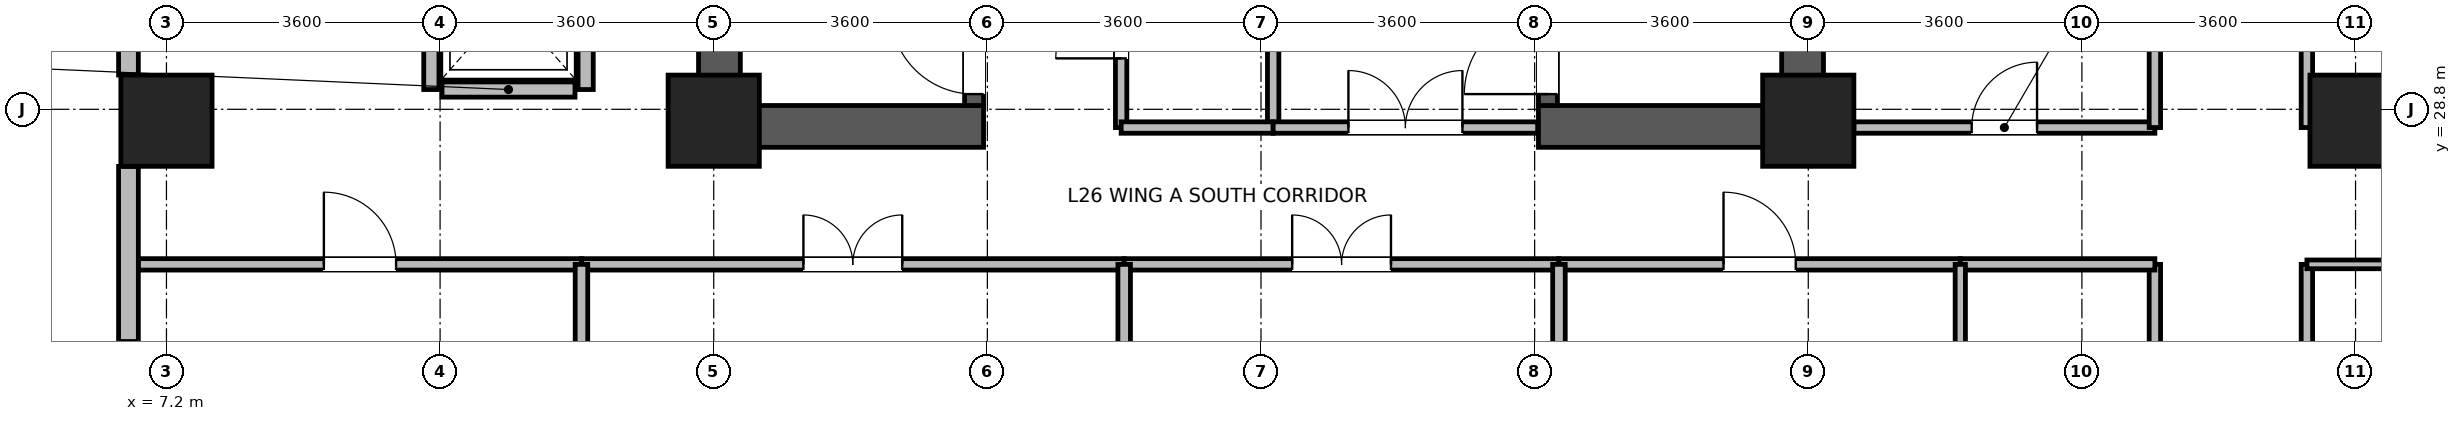
"""IFC4 building model, lengths in metres.
Left out: names, types, materials, properties, quantities, classifications, styles, units other than length and angle.
Written with IfcOpenShell. Run it as: python <this file> out.ifc"""

import sys

from ifc_helpers import new_model, si_unit, direction, frame, frame_2d, origin, origin_2d, place, context, subcontext, project, spatial, rectangle, extrude, source, transform, mapped, element, fill, save


model = new_model("IFC4")
c1 = context("Model", 3, precision=1e-05, world=origin(), true_north=direction((0.0, 1.0)))
c2 = subcontext(c1, "Body", "Model", "MODEL_VIEW")
j1 = project(units=[si_unit("LENGTHUNIT", "METRE"), si_unit("PLANEANGLEUNIT", "RADIAN")], contexts=[c1])
p1 = place(None, origin())
s1 = spatial("IfcSite", under=j1, at=p1, CompositionType="ELEMENT")
p2 = place(p1, origin())
s2 = spatial("IfcBuilding", under=s1, at=p2, CompositionType="ELEMENT")
p3 = place(p2, frame((0.0, 0.0, 104.5)))
s3 = spatial("IfcBuildingStorey", under=s2, at=p3, CompositionType="ELEMENT", Elevation=104.5)
for number, where, z_axis, x_axis in (
    (1, (14.475, 28.3, 0.0), (0.0, 0.0, 1.0), (0.0, 1.0, 0.0)),
    (2, (28.725, 28.3, 0.0), (0.0, 0.0, 1.0), (0.0, 1.0, 0.0)),
):
    element("IfcWall", number, at=place(p3, frame(where, z_axis=z_axis, x_axis=x_axis)), inside=s3, PredefinedType="SHEAR", context=c2, shape_type="SweptSolid", body=[
        extrude(rectangle(XDim=8.1, YDim=0.55, at=frame_2d((4.05, 0.0))), origin(), (0.0, 0.0, 1.0), 3.45),
    ])
for number, where, z_axis, x_axis in (
    (3, (14.75, 28.575, 0.0), (0.0, 0.0, 1.0), (1.0, 0.0, 0.0)),
    (4, (25.25, 28.575, 0.0), (0.0, 0.0, 1.0), (1.0, 0.0, 0.0)),
):
    element("IfcWall", number, at=place(p3, frame(where, z_axis=z_axis, x_axis=x_axis)), inside=s3, PredefinedType="SHEAR", context=c2, shape_type="SweptSolid", body=[
        extrude(rectangle(XDim=3.2, YDim=0.55, at=frame_2d((1.6, 0.0))), origin(), (0.0, 0.0, 1.0), 3.45),
    ])
p4 = place(p3, frame((17.825, 28.85, 0.0), z_axis=(0.0, 0.0, 1.0), x_axis=(0.0, 1.0, 0.0)))
e5 = element("IfcWall", 5, at=p4, inside=s3, PredefinedType="SHEAR", context=c2, shape_type="SweptSolid", body=[
    extrude(rectangle(XDim=7.0, YDim=0.25, at=frame_2d((3.5, 0.0))), origin(), (0.0, 0.0, 1.0), 3.45),
])
p5 = place(p4, frame((0.15, 0.0, 0.0)))
e6 = element("IfcOpeningElement", 6, at=p5, cuts=e5, PredefinedType="OPENING", context=c2, shape_type="SweptSolid", body=[
    extrude(rectangle(XDim=1.1, YDim=2.08, at=frame_2d((0.55, 1.04))), frame((0.0, 0.135, 0.0), z_axis=(0.0, -1.0, 0.0), x_axis=(1.0, 0.0, 0.0)), (0.0, 0.0, 1.0), 0.27),
])
p6 = place(p3, frame((25.375, 28.85, 0.0), z_axis=(0.0, 0.0, 1.0), x_axis=(0.0, 1.0, 0.0)))
e7 = element("IfcWall", 7, at=p6, inside=s3, PredefinedType="SHEAR", context=c2, shape_type="SweptSolid", body=[
    extrude(rectangle(XDim=7.0, YDim=0.25, at=frame_2d((3.5, 0.0))), origin(), (0.0, 0.0, 1.0), 3.45),
])
p7 = place(p6, frame((0.15, 0.0, 0.0)))
e8 = element("IfcOpeningElement", 8, at=p7, cuts=e7, PredefinedType="OPENING", context=c2, shape_type="SweptSolid", body=[
    extrude(rectangle(XDim=1.1, YDim=2.08, at=frame_2d((0.55, 1.04))), frame((0.0, 0.135, 0.0), z_axis=(0.0, -1.0, 0.0), x_axis=(1.0, 0.0, 0.0)), (0.0, 0.0, 1.0), 0.27),
])
m1 = source(origin(), c2, "Body", "SweptSolid", [
    extrude(rectangle(XDim=1.2, YDim=1.2, at=origin_2d()), origin(), (0.0, 0.0, 1.0), 3.7),
])
for number, where, z_axis, x_axis in (
    (9, (7.2, 28.65, 0.0), (0.0, 0.0, 1.0), (1.0, 0.0, 0.0)),
    (10, (14.4, 28.65, 0.0), (0.0, 0.0, 1.0), (1.0, 0.0, 0.0)),
    (11, (28.8, 28.65, 0.0), (0.0, 0.0, 1.0), (1.0, 0.0, 0.0)),
    (12, (36.0, 28.65, 0.0), (0.0, 0.0, 1.0), (1.0, 0.0, 0.0)),
):
    element("IfcColumn", number, at=place(p3, frame(where, z_axis=z_axis, x_axis=x_axis)), inside=s3, PredefinedType="COLUMN", context=c2, shape_type="MappedRepresentation", body=[
        mapped(m1, transform((0.0, 0.0, 0.0), x_axis=(1.0, 0.0, 0.0), y_axis=(0.0, 1.0, 0.0), z_axis=(0.0, 0.0, 1.0), scale=1.0)),
    ])
p8 = place(p3, frame((6.7, 29.251, 0.0), z_axis=(0.0, 0.0, 1.0), x_axis=(0.0, 1.0, 0.0)))
e13 = element("IfcWall", 13, at=p8, inside=s3, PredefinedType="STANDARD", context=c2, shape_type="SweptSolid", body=[
    extrude(rectangle(XDim=6.298, YDim=0.26, at=frame_2d((3.149, 0.0))), origin(), (0.0, 0.0, 1.0), 3.43),
])
p9 = place(p8, frame((0.675, 0.0, 0.85)))
e14 = element("IfcOpeningElement", 14, at=p9, cuts=e13, PredefinedType="OPENING", context=c2, shape_type="SweptSolid", body=[
    extrude(rectangle(XDim=1.8, YDim=1.85, at=frame_2d((0.9, 0.925))), frame((0.0, 0.14, 0.0), z_axis=(0.0, -1.0, 0.0), x_axis=(1.0, 0.0, 0.0)), (0.0, 0.0, 1.0), 0.28),
])
p10 = place(p8, frame((3.823, 0.0, 0.85)))
e15 = element("IfcOpeningElement", 15, at=p10, cuts=e13, PredefinedType="OPENING", context=c2, shape_type="SweptSolid", body=[
    extrude(rectangle(XDim=1.8, YDim=1.85, at=frame_2d((0.9, 0.925))), frame((0.0, 0.14, 0.0), z_axis=(0.0, -1.0, 0.0), x_axis=(1.0, 0.0, 0.0)), (0.0, 0.0, 1.0), 0.28),
])
p11 = place(p3, frame((6.7, 21.47, 0.0), z_axis=(0.0, 0.0, 1.0), x_axis=(0.0, 1.0, 0.0)))
e16 = element("IfcWall", 16, at=p11, inside=s3, PredefinedType="STANDARD", context=c2, shape_type="SweptSolid", body=[
    extrude(rectangle(XDim=6.579, YDim=0.26, at=frame_2d((3.29, 0.0))), origin(), (0.0, 0.0, 1.0), 3.43),
])
p12 = place(p11, frame((0.745, 0.0, 0.85)))
e17 = element("IfcOpeningElement", 17, at=p12, cuts=e16, PredefinedType="OPENING", context=c2, shape_type="SweptSolid", body=[
    extrude(rectangle(XDim=1.8, YDim=1.85, at=frame_2d((0.9, 0.925))), frame((0.0, 0.14, 0.0), z_axis=(0.0, -1.0, 0.0), x_axis=(1.0, 0.0, 0.0)), (0.0, 0.0, 1.0), 0.28),
])
p13 = place(p11, frame((3.341, 0.0, 0.85)))
e18 = element("IfcOpeningElement", 18, at=p13, cuts=e16, PredefinedType="OPENING", context=c2, shape_type="SweptSolid", body=[
    extrude(rectangle(XDim=0.95, YDim=1.75, at=frame_2d((0.475, 0.875))), frame((0.0, 0.14, 0.0), z_axis=(0.0, -1.0, 0.0), x_axis=(1.0, 0.0, 0.0)), (0.0, 0.0, 1.0), 0.28),
])
p14 = place(p3, frame((10.825, 29.06, 0.0), z_axis=(0.0, 0.0, 1.0), x_axis=(1.0, 0.0, 0.0)))
e19 = element("IfcWall", 19, at=p14, inside=s3, PredefinedType="PARTITIONING", context=c2, shape_type="SweptSolid", body=[
    extrude(rectangle(XDim=1.75, YDim=0.2, at=frame_2d((0.875, 0.0))), origin(), (0.0, 0.0, 1.0), 3.43),
])
for number, where, z_axis, x_axis in (
    (20, (10.685, 29.06, 0.0), (0.0, 0.0, 1.0), (0.0, 1.0, 0.0)),
    (21, (12.715, 29.06, 0.0), (0.0, 0.0, 1.0), (0.0, 1.0, 0.0)),
):
    element("IfcWall", number, at=place(p3, frame(where, z_axis=z_axis, x_axis=x_axis)), inside=s3, PredefinedType="PARTITIONING", context=c2, shape_type="SweptSolid", body=[
        extrude(rectangle(XDim=2.28, YDim=0.2, at=frame_2d((1.14, 0.0))), origin(), (0.0, 0.0, 1.0), 3.43),
    ])
p15 = place(p3, frame((35.36, 16.96, 0.0), z_axis=(0.0, 0.0, 1.0), x_axis=(0.0, 1.0, 0.0)))
e22 = element("IfcWall", 22, at=p15, inside=s3, PredefinedType="PARTITIONING", context=c2, shape_type="SweptSolid", body=[
    extrude(rectangle(XDim=9.8, YDim=0.15, at=frame_2d((4.9, 0.0))), origin(), (0.0, 0.0, 1.0), 3.43),
])
p16 = place(p15, frame((2.486, 0.0, 0.0)))
e23 = element("IfcOpeningElement", 23, at=p16, cuts=e22, PredefinedType="OPENING", context=c2, shape_type="SweptSolid", body=[
    extrude(rectangle(XDim=1.3, YDim=2.12, at=frame_2d((0.65, 1.06))), frame((0.0, 0.085, 0.0), z_axis=(0.0, -1.0, 0.0), x_axis=(1.0, 0.0, 0.0)), (0.0, 0.0, 1.0), 0.17),
])
p17 = place(p3, frame((35.36, 28.56, 0.0), z_axis=(0.0, 0.0, 1.0), x_axis=(0.0, 1.0, 0.0)))
e24 = element("IfcWall", 24, at=p17, inside=s3, PredefinedType="PARTITIONING", context=c2, shape_type="SweptSolid", body=[
    extrude(rectangle(XDim=7.68, YDim=0.15, at=frame_2d((3.84, 0.0))), origin(), (0.0, 0.0, 1.0), 3.43),
])
p18 = place(p17, frame((3.19, 0.0, 0.0)))
e25 = element("IfcOpeningElement", 25, at=p18, cuts=e24, PredefinedType="OPENING", context=c2, shape_type="SweptSolid", body=[
    extrude(rectangle(XDim=1.3, YDim=2.12, at=frame_2d((0.65, 1.06))), frame((0.0, 0.085, 0.0), z_axis=(0.0, -1.0, 0.0), x_axis=(1.0, 0.0, 0.0)), (0.0, 0.0, 1.0), 0.17),
])
p19 = place(p3, frame((12.66, 26.76, 0.0), z_axis=(0.0, 0.0, 1.0), x_axis=(1.0, 0.0, 0.0)))
e26 = element("IfcWall", 26, at=p19, inside=s3, PredefinedType="PARTITIONING", context=c2, shape_type="SweptSolid", body=[
    extrude(rectangle(XDim=7.14, YDim=0.15, at=frame_2d((3.57, 0.0))), origin(), (0.0, 0.0, 1.0), 3.43),
])
p20 = place(p19, frame((2.92, 0.0, 0.0)))
e27 = element("IfcOpeningElement", 27, at=p20, cuts=e26, PredefinedType="OPENING", context=c2, shape_type="SweptSolid", body=[
    extrude(rectangle(XDim=1.3, YDim=2.12, at=frame_2d((0.65, 1.06))), frame((0.0, 0.085, 0.0), z_axis=(0.0, -1.0, 0.0), x_axis=(1.0, 0.0, 0.0)), (0.0, 0.0, 1.0), 0.17),
])
p21 = place(p3, frame((6.832, 26.76, 0.0), z_axis=(0.0, 0.0, 1.0), x_axis=(1.0, 0.0, 0.0)))
e28 = element("IfcWall", 28, at=p21, inside=s3, PredefinedType="PARTITIONING", context=c2, shape_type="SweptSolid", body=[
    extrude(rectangle(XDim=5.828, YDim=0.15, at=frame_2d((2.914, 0.0))), origin(), (0.0, 0.0, 1.0), 3.43),
])
p22 = place(p21, frame((2.439, 0.0, 0.0)))
e29 = element("IfcOpeningElement", 29, at=p22, cuts=e28, PredefinedType="OPENING", context=c2, shape_type="SweptSolid", body=[
    extrude(rectangle(XDim=0.95, YDim=2.1, at=frame_2d((0.475, 1.05))), frame((0.0, 0.085, 0.0), z_axis=(0.0, -1.0, 0.0), x_axis=(1.0, 0.0, 0.0)), (0.0, 0.0, 1.0), 0.17),
])
p23 = place(p3, frame((19.8, 26.76, 0.0), z_axis=(0.0, 0.0, 1.0), x_axis=(1.0, 0.0, 0.0)))
e30 = element("IfcWall", 30, at=p23, inside=s3, PredefinedType="PARTITIONING", context=c2, shape_type="SweptSolid", body=[
    extrude(rectangle(XDim=5.72, YDim=0.15, at=frame_2d((2.86, 0.0))), origin(), (0.0, 0.0, 1.0), 3.43),
])
p24 = place(p23, frame((2.21, 0.0, 0.0)))
e31 = element("IfcOpeningElement", 31, at=p24, cuts=e30, PredefinedType="OPENING", context=c2, shape_type="SweptSolid", body=[
    extrude(rectangle(XDim=1.3, YDim=2.12, at=frame_2d((0.65, 1.06))), frame((0.0, 0.085, 0.0), z_axis=(0.0, -1.0, 0.0), x_axis=(1.0, 0.0, 0.0)), (0.0, 0.0, 1.0), 0.17),
])
p25 = place(p3, frame((25.52, 26.76, 0.0), z_axis=(0.0, 0.0, 1.0), x_axis=(1.0, 0.0, 0.0)))
e32 = element("IfcWall", 32, at=p25, inside=s3, PredefinedType="PARTITIONING", context=c2, shape_type="SweptSolid", body=[
    extrude(rectangle(XDim=5.28, YDim=0.15, at=frame_2d((2.64, 0.0))), origin(), (0.0, 0.0, 1.0), 3.43),
])
p26 = place(p25, frame((2.165, 0.0, 0.0)))
e33 = element("IfcOpeningElement", 33, at=p26, cuts=e32, PredefinedType="OPENING", context=c2, shape_type="SweptSolid", body=[
    extrude(rectangle(XDim=0.95, YDim=2.1, at=frame_2d((0.475, 1.05))), frame((0.0, 0.085, 0.0), z_axis=(0.0, -1.0, 0.0), x_axis=(1.0, 0.0, 0.0)), (0.0, 0.0, 1.0), 0.17),
])
p27 = place(p3, frame((33.36, 21.6, 0.0), z_axis=(0.0, 0.0, 1.0), x_axis=(0.0, 1.0, 0.0)))
e34 = element("IfcWall", 34, at=p27, inside=s3, PredefinedType="PARTITIONING", context=c2, shape_type="SweptSolid", body=[
    extrude(rectangle(XDim=5.16, YDim=0.15, at=frame_2d((2.58, 0.0))), origin(), (0.0, 0.0, 1.0), 3.43),
])
p28 = place(p27, frame((2.155, 0.0, 0.0)))
e35 = element("IfcOpeningElement", 35, at=p28, cuts=e34, PredefinedType="OPENING", context=c2, shape_type="SweptSolid", body=[
    extrude(rectangle(XDim=0.85, YDim=2.04, at=frame_2d((0.425, 1.02))), frame((0.0, 0.085, 0.0), z_axis=(0.0, -1.0, 0.0), x_axis=(1.0, 0.0, 0.0)), (0.0, 0.0, 1.0), 0.17),
])
p29 = place(p3, frame((29.4, 28.56, 0.0), z_axis=(0.0, 0.0, 1.0), x_axis=(1.0, 0.0, 0.0)))
e36 = element("IfcWall", 36, at=p29, inside=s3, PredefinedType="PARTITIONING", context=c2, shape_type="SweptSolid", body=[
    extrude(rectangle(XDim=3.96, YDim=0.15, at=frame_2d((1.98, 0.0))), origin(), (0.0, 0.0, 1.0), 2.78),
])
p30 = place(p29, frame((1.55, 0.0, 0.0)))
e37 = element("IfcOpeningElement", 37, at=p30, cuts=e36, PredefinedType="OPENING", context=c2, shape_type="SweptSolid", body=[
    extrude(rectangle(XDim=0.86, YDim=2.02, at=frame_2d((0.43, 1.01))), frame((0.0, 0.085, 0.0), z_axis=(0.0, -1.0, 0.0), x_axis=(1.0, 0.0, 0.0)), (0.0, 0.0, 1.0), 0.17),
])
p31 = place(p3, frame((33.36, 28.56, 0.0), z_axis=(0.0, 0.0, 1.0), x_axis=(0.0, 1.0, 0.0)))
e38 = element("IfcWall", 38, at=p31, inside=s3, PredefinedType="PARTITIONING", context=c2, shape_type="SweptSolid", body=[
    extrude(rectangle(XDim=3.08, YDim=0.15, at=frame_2d((1.54, 0.0))), origin(), (0.0, 0.0, 1.0), 3.43),
])
p32 = place(p3, frame((19.76, 28.56, 0.0), z_axis=(0.0, 0.0, 1.0), x_axis=(0.0, 1.0, 0.0)))
e39 = element("IfcWall", 39, at=p32, inside=s3, PredefinedType="PARTITIONING", context=c2, shape_type="SweptSolid", body=[
    extrude(rectangle(XDim=2.68, YDim=0.15, at=frame_2d((1.34, 0.0))), origin(), (0.0, 0.0, 1.0), 3.43),
])
p33 = place(p32, frame((0.91, 0.0, 0.0)))
e40 = element("IfcOpeningElement", 40, at=p33, cuts=e39, PredefinedType="OPENING", context=c2, shape_type="SweptSolid", body=[
    extrude(rectangle(XDim=0.86, YDim=2.02, at=frame_2d((0.43, 1.01))), frame((0.0, 0.085, 0.0), z_axis=(0.0, -1.0, 0.0), x_axis=(1.0, 0.0, 0.0)), (0.0, 0.0, 1.0), 0.17),
])
p34 = place(p3, frame((21.76, 28.56, 0.0), z_axis=(0.0, 0.0, 1.0), x_axis=(0.0, 1.0, 0.0)))
e41 = element("IfcWall", 41, at=p34, inside=s3, PredefinedType="PARTITIONING", context=c2, shape_type="SweptSolid", body=[
    extrude(rectangle(XDim=2.68, YDim=0.15, at=frame_2d((1.34, 0.0))), origin(), (0.0, 0.0, 1.0), 3.43),
])
p35 = place(p3, frame((30.8, 26.76, 0.0), z_axis=(0.0, 0.0, 1.0), x_axis=(1.0, 0.0, 0.0)))
e42 = element("IfcWall", 42, at=p35, inside=s3, PredefinedType="PARTITIONING", context=c2, shape_type="SweptSolid", body=[
    extrude(rectangle(XDim=2.56, YDim=0.15, at=frame_2d((1.28, 0.0))), origin(), (0.0, 0.0, 1.0), 3.43),
])
p36 = place(p3, frame((19.76, 28.56, 0.0), z_axis=(0.0, 0.0, 1.0), x_axis=(1.0, 0.0, 0.0)))
e43 = element("IfcWall", 43, at=p36, inside=s3, PredefinedType="PARTITIONING", context=c2, shape_type="SweptSolid", body=[
    extrude(rectangle(XDim=2.0, YDim=0.15, at=frame_2d((1.0, 0.0))), origin(), (0.0, 0.0, 1.0), 2.43),
])
p37 = place(p3, frame((35.36, 26.76, 0.0), z_axis=(0.0, 0.0, 1.0), x_axis=(1.0, 0.0, 0.0)))
e44 = element("IfcWall", 44, at=p37, inside=s3, PredefinedType="PARTITIONING", context=c2, shape_type="SweptSolid", body=[
    extrude(rectangle(XDim=5.86, YDim=0.115, at=frame_2d((2.93, 0.0))), origin(), (0.0, 0.0, 1.0), 3.43),
])
for number, where, z_axis, x_axis in (
    (45, (19.8, 21.732, 0.0), (0.0, 0.0, 1.0), (0.0, 1.0, 0.0)),
    (46, (25.52, 21.732, 0.0), (0.0, 0.0, 1.0), (0.0, 1.0, 0.0)),
):
    element("IfcWall", number, at=place(p3, frame(where, z_axis=z_axis, x_axis=x_axis)), inside=s3, PredefinedType="PARTITIONING", context=c2, shape_type="SweptSolid", body=[
        extrude(rectangle(XDim=5.028, YDim=0.165, at=frame_2d((2.514, 0.0))), origin(), (0.0, 0.0, 1.0), 3.43),
    ])
p38 = place(p3, frame((30.8, 21.732, 0.0), z_axis=(0.0, 0.0, 1.0), x_axis=(0.0, 1.0, 0.0)))
e47 = element("IfcWall", 47, at=p38, inside=s3, PredefinedType="PARTITIONING", context=c2, shape_type="SweptSolid", body=[
    extrude(rectangle(XDim=5.028, YDim=0.135, at=frame_2d((2.514, 0.0))), origin(), (0.0, 0.0, 1.0), 3.43),
])
p39 = place(p3, frame((21.76, 28.56, 0.0), z_axis=(0.0, 0.0, 1.0), x_axis=(1.0, 0.0, 0.0)))
e48 = element("IfcWall", 48, at=p39, inside=s3, PredefinedType="PARTITIONING", context=c2, shape_type="SweptSolid", body=[
    extrude(rectangle(XDim=3.48, YDim=0.15, at=frame_2d((1.74, 0.0))), origin(), (0.0, 0.0, 1.0), 2.43),
])
p40 = place(p39, frame((0.99, 0.0, 0.0)))
e49 = element("IfcOpeningElement", 49, at=p40, cuts=e48, PredefinedType="OPENING", context=c2, shape_type="SweptSolid", body=[
    extrude(rectangle(XDim=1.5, YDim=2.1, at=frame_2d((0.75, 1.05))), frame((0.0, 0.085, 0.0), z_axis=(0.0, -1.0, 0.0), x_axis=(1.0, 0.0, 0.0)), (0.0, 0.0, 1.0), 0.17),
])
p41 = place(p3, frame((12.66, 23.5, 0.0), z_axis=(0.0, 0.0, 1.0), x_axis=(0.0, 1.0, 0.0)))
e50 = element("IfcWall", 50, at=p41, inside=s3, PredefinedType="PARTITIONING", context=c2, shape_type="SweptSolid", body=[
    extrude(rectangle(XDim=3.26, YDim=0.165, at=frame_2d((1.63, 0.0))), origin(), (0.0, 0.0, 1.0), 3.43),
])
p42 = place(p13, origin())
e51 = element("IfcWindow", 51, at=p42, inside=s3, PartitioningType="SINGLE_PANEL", PredefinedType="WINDOW", context=c2, shape_type="SweptSolid", body=[
    extrude(rectangle(XDim=0.95, YDim=1.75, at=frame_2d((0.475, 0.875))), frame((0.0, 0.03, 0.0), z_axis=(0.0, -1.0, 0.0), x_axis=(1.0, 0.0, 0.0)), (0.0, 0.0, 1.0), 0.06),
])
fill(e18, e51)
p43 = place(p5, origin())
e52 = element("IfcDoor", 52, at=p43, inside=s3, OperationType="SINGLE_SWING_RIGHT", PredefinedType="DOOR", context=c2, shape_type="SweptSolid", body=[
    extrude(rectangle(XDim=1.1, YDim=2.08, at=frame_2d((0.55, 1.04))), frame((0.0, 0.025, 0.0), z_axis=(0.0, -1.0, 0.0), x_axis=(1.0, 0.0, 0.0)), (0.0, 0.0, 1.0), 0.05),
])
fill(e6, e52)
p44 = place(p7, origin())
e53 = element("IfcDoor", 53, at=p44, inside=s3, OperationType="SINGLE_SWING_LEFT", PredefinedType="DOOR", context=c2, shape_type="SweptSolid", body=[
    extrude(rectangle(XDim=1.1, YDim=2.08, at=frame_2d((0.55, 1.04))), frame((0.0, 0.025, 0.0), z_axis=(0.0, -1.0, 0.0), x_axis=(1.0, 0.0, 0.0)), (0.0, 0.0, 1.0), 0.05),
])
fill(e8, e53)
p45 = place(p20, origin())
e54 = element("IfcDoor", 54, at=p45, inside=s3, OperationType="DOUBLE_DOOR_SINGLE_SWING", PredefinedType="DOOR", context=c2, shape_type="SweptSolid", body=[
    extrude(rectangle(XDim=1.3, YDim=2.12, at=frame_2d((0.65, 1.06))), frame((0.0, 0.025, 0.0), z_axis=(0.0, -1.0, 0.0), x_axis=(1.0, 0.0, 0.0)), (0.0, 0.0, 1.0), 0.05),
])
fill(e27, e54)
p46 = place(p22, origin())
e55 = element("IfcDoor", 55, at=p46, inside=s3, OperationType="SINGLE_SWING_LEFT", PredefinedType="DOOR", context=c2, shape_type="SweptSolid", body=[
    extrude(rectangle(XDim=0.95, YDim=2.1, at=frame_2d((0.475, 1.05))), frame((0.0, 0.025, 0.0), z_axis=(0.0, -1.0, 0.0), x_axis=(1.0, 0.0, 0.0)), (0.0, 0.0, 1.0), 0.05),
])
fill(e29, e55)
p47 = place(p24, origin())
e56 = element("IfcDoor", 56, at=p47, inside=s3, OperationType="DOUBLE_DOOR_SINGLE_SWING", PredefinedType="DOOR", context=c2, shape_type="SweptSolid", body=[
    extrude(rectangle(XDim=1.3, YDim=2.12, at=frame_2d((0.65, 1.06))), frame((0.0, 0.025, 0.0), z_axis=(0.0, -1.0, 0.0), x_axis=(1.0, 0.0, 0.0)), (0.0, 0.0, 1.0), 0.05),
])
fill(e31, e56)
p48 = place(p26, origin())
e57 = element("IfcDoor", 57, at=p48, inside=s3, OperationType="SINGLE_SWING_LEFT", PredefinedType="DOOR", context=c2, shape_type="SweptSolid", body=[
    extrude(rectangle(XDim=0.95, YDim=2.1, at=frame_2d((0.475, 1.05))), frame((0.0, 0.025, 0.0), z_axis=(0.0, -1.0, 0.0), x_axis=(1.0, 0.0, 0.0)), (0.0, 0.0, 1.0), 0.05),
])
fill(e33, e57)
p49 = place(p30, origin())
e58 = element("IfcDoor", 58, at=p49, inside=s3, OperationType="SINGLE_SWING_RIGHT", PredefinedType="DOOR", context=c2, shape_type="SweptSolid", body=[
    extrude(rectangle(XDim=0.86, YDim=2.02, at=frame_2d((0.43, 1.01))), frame((0.0, 0.025, 0.0), z_axis=(0.0, -1.0, 0.0), x_axis=(1.0, 0.0, 0.0)), (0.0, 0.0, 1.0), 0.05),
])
fill(e37, e58)
p50 = place(p33, origin())
e59 = element("IfcDoor", 59, at=p50, inside=s3, OperationType="SINGLE_SWING_LEFT", PredefinedType="DOOR", context=c2, shape_type="SweptSolid", body=[
    extrude(rectangle(XDim=0.86, YDim=2.02, at=frame_2d((0.43, 1.01))), frame((0.0, 0.025, 0.0), z_axis=(0.0, -1.0, 0.0), x_axis=(1.0, 0.0, 0.0)), (0.0, 0.0, 1.0), 0.05),
])
fill(e40, e59)
p51 = place(p40, origin())
e60 = element("IfcDoor", 60, at=p51, inside=s3, OperationType="DOUBLE_DOOR_SINGLE_SWING", PredefinedType="DOOR", context=c2, shape_type="SweptSolid", body=[
    extrude(rectangle(XDim=1.5, YDim=2.1, at=frame_2d((0.75, 1.05))), frame((0.0, 0.025, 0.0), z_axis=(0.0, -1.0, 0.0), x_axis=(1.0, 0.0, 0.0)), (0.0, 0.0, 1.0), 0.05),
])
fill(e49, e60)
save(model, sys.argv[1])
